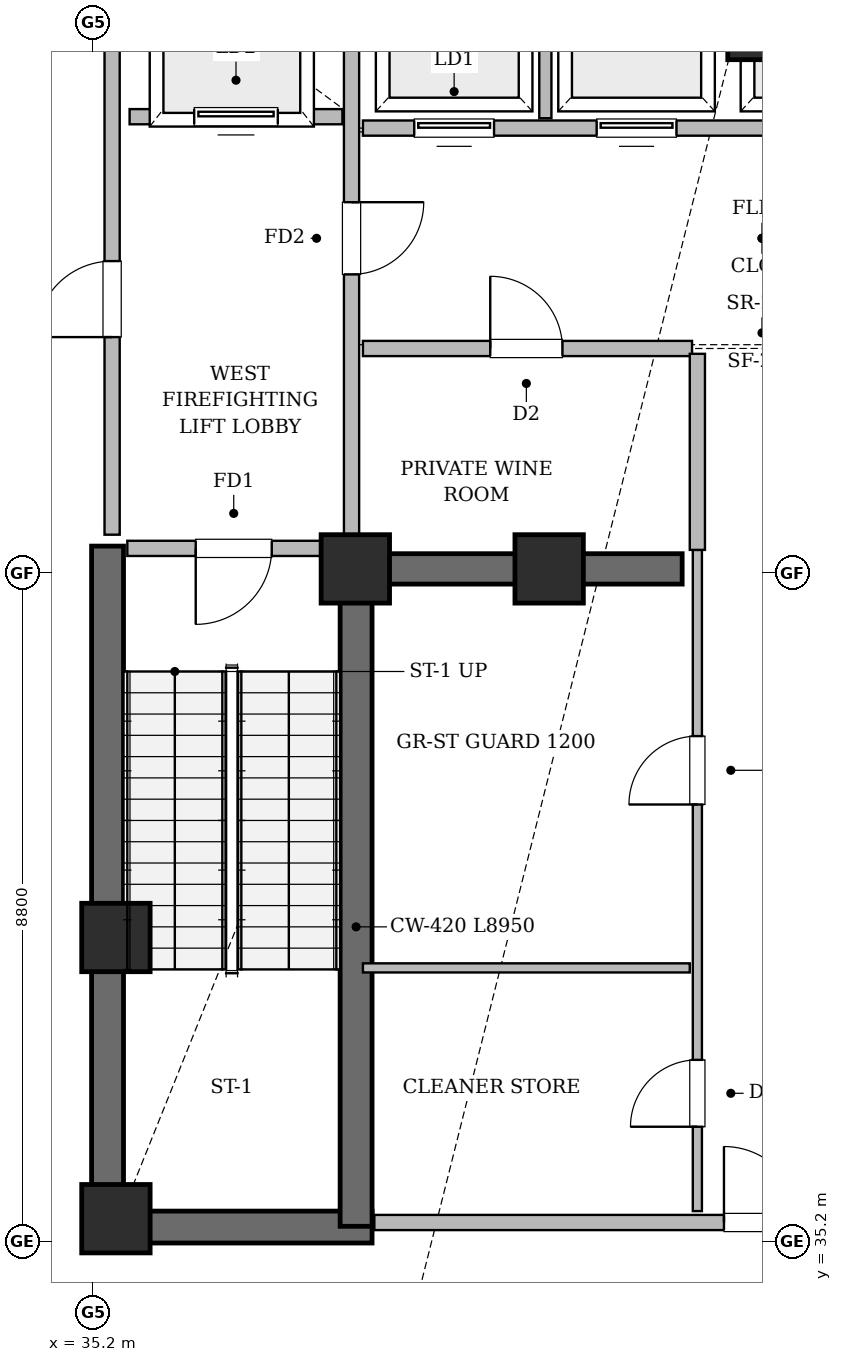
"""IFC4 building model, lengths in metres.
Left out: names, types, materials, properties, quantities, classifications, styles, units other than length and angle.
Written with IfcOpenShell. Run it as: python <this file> out.ifc"""

import sys

from ifc_helpers import new_model, si_unit, direction, frame, frame_2d, origin, origin_2d, place, context, subcontext, project, spatial, rectangle, extrude, element, fill, save


model = new_model("IFC4")
c1 = context("Model", 3, precision=1e-05, world=origin(), true_north=direction((0.0, 1.0)))
c2 = subcontext(c1, "Body", "Model", "MODEL_VIEW")
j1 = project(units=[si_unit("LENGTHUNIT", "METRE"), si_unit("PLANEANGLEUNIT", "RADIAN")], contexts=[c1])
p1 = place(None, origin())
s1 = spatial("IfcSite", under=j1, at=p1, CompositionType="ELEMENT")
p2 = place(p1, origin())
s2 = spatial("IfcBuilding", under=s1, at=p2, CompositionType="ELEMENT")
p3 = place(p2, frame((0.0, 0.0, 295.4)))
s3 = spatial("IfcBuildingStorey", under=s2, at=p3, CompositionType="ELEMENT", Elevation=295.4)
p4 = place(p3, frame((35.18, 35.39, 0.0), z_axis=(0.0, 0.0, 1.0), x_axis=(1.0, 0.0, 0.0)))
e1 = element("IfcWall", 1, at=p4, inside=s3, PredefinedType="SHEAR", context=c2, shape_type="SweptSolid", body=[
    extrude(rectangle(XDim=3.69, YDim=0.42, at=frame_2d((1.845, 0.0))), origin(), (0.0, 0.0, 1.0), 5.14),
])
p5 = place(p3, frame((35.39, 35.18, 0.0), z_axis=(0.0, 0.0, 1.0), x_axis=(0.0, 1.0, 0.0)))
e2 = element("IfcWall", 2, at=p5, inside=s3, PredefinedType="SHEAR", context=c2, shape_type="SweptSolid", body=[
    extrude(rectangle(XDim=9.17, YDim=0.42, at=frame_2d((4.585, 0.0))), origin(), (0.0, 0.0, 1.0), 5.14),
])
p6 = place(p3, frame((38.66, 35.4, 0.0), z_axis=(0.0, 0.0, 1.0), x_axis=(0.0, 1.0, 0.0)))
e3 = element("IfcWall", 3, at=p6, inside=s3, PredefinedType="SHEAR", context=c2, shape_type="SweptSolid", body=[
    extrude(rectangle(XDim=8.95, YDim=0.42, at=frame_2d((4.475, 0.0))), origin(), (0.0, 0.0, 1.0), 5.14),
])
p7 = place(p3, frame((44.0, 50.1, 0.0), z_axis=(0.0, 0.0, 1.0), x_axis=(0.0, 1.0, 0.0)))
e4 = element("IfcWall", 4, at=p7, inside=s3, PredefinedType="SHEAR", context=c2, shape_type="SweptSolid", body=[
    extrude(rectangle(XDim=2.1, YDim=0.4, at=frame_2d((1.05, 0.0))), origin(), (0.0, 0.0, 1.0), 5.14),
])
p8 = place(p3, frame((38.75, 44.05, 0.0), z_axis=(0.0, 0.0, 1.0), x_axis=(1.0, 0.0, 0.0)))
e5 = element("IfcWall", 5, at=p8, inside=s3, PredefinedType="SHEAR", context=c2, shape_type="SweptSolid", body=[
    extrude(rectangle(XDim=4.2, YDim=0.4, at=frame_2d((2.1, 0.0))), origin(), (0.0, 0.0, 1.0), 5.14),
])
for number, where, z_axis, x_axis in (
    (6, (35.5, 35.5, 0.0), (0.0, 0.0, 1.0), (1.0, 0.0, 0.0)),
    (7, (38.65, 44.05, 0.0), (0.0, 0.0, 1.0), (1.0, 0.0, 0.0)),
    (8, (44.0, 51.2, 0.0), (0.0, 0.0, 1.0), (1.0, 0.0, 0.0)),
    (9, (35.5, 39.2, 0.0), (0.0, 0.0, 1.0), (1.0, 0.0, 0.0)),
    (10, (41.2, 44.05, 0.0), (0.0, 0.0, 1.0), (1.0, 0.0, 0.0)),
):
    element("IfcColumn", number, at=place(p3, frame(where, z_axis=z_axis, x_axis=x_axis)), inside=s3, PredefinedType="COLUMN", context=c2, shape_type="SweptSolid", body=[
        extrude(rectangle(XDim=0.9, YDim=0.9, at=origin_2d()), origin(), (0.0, 0.0, 1.0), 5.4),
    ])
p9 = place(p3, frame((38.9, 35.45, 0.0), z_axis=(0.0, 0.0, 1.0), x_axis=(1.0, 0.0, 0.0)))
e11 = element("IfcWall", 11, at=p9, inside=s3, PredefinedType="SOLIDWALL", context=c2, shape_type="SweptSolid", body=[
    extrude(rectangle(XDim=10.2, YDim=0.2, at=frame_2d((5.1, 0.0))), origin(), (0.0, 0.0, 1.0), 5.14),
])
p10 = place(p9, frame((4.6, 0.0, 0.0)))
e12 = element("IfcOpeningElement", 12, at=p10, cuts=e11, PredefinedType="OPENING", context=c2, shape_type="SweptSolid", body=[
    extrude(rectangle(XDim=1.0, YDim=2.15, at=frame_2d((0.5, 1.075))), frame((0.0, 0.11, 0.0), z_axis=(0.0, -1.0, 0.0), x_axis=(1.0, 0.0, 0.0)), (0.0, 0.0, 1.0), 0.22),
])
p11 = place(p3, frame((43.15, 35.6, 0.0), z_axis=(0.0, 0.0, 1.0), x_axis=(0.0, 1.0, 0.0)))
e13 = element("IfcWall", 13, at=p11, inside=s3, PredefinedType="PARTITIONING", context=c2, shape_type="SweptSolid", body=[
    extrude(rectangle(XDim=8.7, YDim=0.12, at=frame_2d((4.35, 0.0))), origin(), (0.0, 0.0, 1.0), 5.14),
])
p12 = place(p11, frame((1.11, 0.0, 0.0)))
e14 = element("IfcOpeningElement", 14, at=p12, cuts=e13, PredefinedType="OPENING", context=c2, shape_type="SweptSolid", body=[
    extrude(rectangle(XDim=0.88, YDim=2.1, at=frame_2d((0.44, 1.05))), frame((0.0, 0.07, 0.0), z_axis=(0.0, -1.0, 0.0), x_axis=(1.0, 0.0, 0.0)), (0.0, 0.0, 1.0), 0.14),
])
p13 = place(p11, frame((5.35, 0.0, 0.0)))
e15 = element("IfcOpeningElement", 15, at=p13, cuts=e13, PredefinedType="OPENING", context=c2, shape_type="SweptSolid", body=[
    extrude(rectangle(XDim=0.9, YDim=2.1, at=frame_2d((0.45, 1.05))), frame((0.0, 0.07, 0.0), z_axis=(0.0, -1.0, 0.0), x_axis=(1.0, 0.0, 0.0)), (0.0, 0.0, 1.0), 0.14),
])
p14 = place(p3, frame((35.45, 44.5, 0.0), z_axis=(0.0, 0.0, 1.0), x_axis=(0.0, 1.0, 0.0)))
e16 = element("IfcWall", 16, at=p14, inside=s3, PredefinedType="SOLIDWALL", context=c2, shape_type="SweptSolid", body=[
    extrude(rectangle(XDim=7.92, YDim=0.2, at=frame_2d((3.96, 0.0))), origin(), (0.0, 0.0, 1.0), 5.14),
])
p15 = place(p14, frame((2.6, 0.0, 0.0)))
e17 = element("IfcOpeningElement", 17, at=p15, cuts=e16, PredefinedType="OPENING", context=c2, shape_type="SweptSolid", body=[
    extrude(rectangle(XDim=1.0, YDim=2.15, at=frame_2d((0.5, 1.075))), frame((0.0, 0.11, 0.0), z_axis=(0.0, -1.0, 0.0), x_axis=(1.0, 0.0, 0.0)), (0.0, 0.0, 1.0), 0.22),
])
p16 = place(p3, frame((38.6, 44.5, 0.0), z_axis=(0.0, 0.0, 1.0), x_axis=(0.0, 1.0, 0.0)))
e18 = element("IfcWall", 18, at=p16, inside=s3, PredefinedType="SOLIDWALL", context=c2, shape_type="SweptSolid", body=[
    extrude(rectangle(XDim=7.92, YDim=0.2, at=frame_2d((3.96, 0.0))), origin(), (0.0, 0.0, 1.0), 5.14),
])
p17 = place(p16, frame((3.425, 0.0, 0.0)))
e19 = element("IfcOpeningElement", 19, at=p17, cuts=e18, PredefinedType="OPENING", context=c2, shape_type="SweptSolid", body=[
    extrude(rectangle(XDim=0.95, YDim=2.15, at=frame_2d((0.475, 1.075))), frame((0.0, 0.11, 0.0), z_axis=(0.0, -1.0, 0.0), x_axis=(1.0, 0.0, 0.0)), (0.0, 0.0, 1.0), 0.22),
])
p18 = place(p3, frame((38.75, 49.85, 0.0), z_axis=(0.0, 0.0, 1.0), x_axis=(1.0, 0.0, 0.0)))
e20 = element("IfcWall", 20, at=p18, inside=s3, PredefinedType="SOLIDWALL", context=c2, shape_type="SweptSolid", body=[
    extrude(rectangle(XDim=5.5, YDim=0.2, at=frame_2d((2.75, 0.0))), origin(), (0.0, 0.0, 1.0), 5.14),
])
p19 = place(p18, frame((0.675, 0.0, 0.0)))
e21 = element("IfcOpeningElement", 21, at=p19, cuts=e20, PredefinedType="OPENING", context=c2, shape_type="SweptSolid", body=[
    extrude(rectangle(XDim=1.05, YDim=2.15, at=frame_2d((0.525, 1.075))), frame((0.0, 0.11, 0.0), z_axis=(0.0, -1.0, 0.0), x_axis=(1.0, 0.0, 0.0)), (0.0, 0.0, 1.0), 0.22),
])
p20 = place(p18, frame((3.075, 0.0, 0.0)))
e22 = element("IfcOpeningElement", 22, at=p20, cuts=e20, PredefinedType="OPENING", context=c2, shape_type="SweptSolid", body=[
    extrude(rectangle(XDim=1.05, YDim=2.15, at=frame_2d((0.525, 1.075))), frame((0.0, 0.11, 0.0), z_axis=(0.0, -1.0, 0.0), x_axis=(1.0, 0.0, 0.0)), (0.0, 0.0, 1.0), 0.22),
])
p21 = place(p3, frame((38.75, 46.95, 0.0), z_axis=(0.0, 0.0, 1.0), x_axis=(1.0, 0.0, 0.0)))
e23 = element("IfcWall", 23, at=p21, inside=s3, PredefinedType="SOLIDWALL", context=c2, shape_type="SweptSolid", body=[
    extrude(rectangle(XDim=4.33, YDim=0.2, at=frame_2d((2.165, 0.0))), origin(), (0.0, 0.0, 1.0), 5.14),
])
p22 = place(p21, frame((1.675, 0.0, 0.0)))
e24 = element("IfcOpeningElement", 24, at=p22, cuts=e23, PredefinedType="OPENING", context=c2, shape_type="SweptSolid", body=[
    extrude(rectangle(XDim=0.95, YDim=2.1, at=frame_2d((0.475, 1.05))), frame((0.0, 0.11, 0.0), z_axis=(0.0, -1.0, 0.0), x_axis=(1.0, 0.0, 0.0)), (0.0, 0.0, 1.0), 0.22),
])
p23 = place(p3, frame((35.65, 44.32, 0.0), z_axis=(0.0, 0.0, 1.0), x_axis=(1.0, 0.0, 0.0)))
e25 = element("IfcWall", 25, at=p23, inside=s3, PredefinedType="SOLIDWALL", context=c2, shape_type="SweptSolid", body=[
    extrude(rectangle(XDim=2.8, YDim=0.2, at=frame_2d((1.4, 0.0))), origin(), (0.0, 0.0, 1.0), 5.14),
])
p24 = place(p23, frame((0.9, 0.0, 0.0)))
e26 = element("IfcOpeningElement", 26, at=p24, cuts=e25, PredefinedType="OPENING", context=c2, shape_type="SweptSolid", body=[
    extrude(rectangle(XDim=1.0, YDim=2.15, at=frame_2d((0.5, 1.075))), frame((0.0, 0.11, 0.0), z_axis=(0.0, -1.0, 0.0), x_axis=(1.0, 0.0, 0.0)), (0.0, 0.0, 1.0), 0.22),
])
p25 = place(p3, frame((35.68, 50.0, 0.0), z_axis=(0.0, 0.0, 1.0), x_axis=(1.0, 0.0, 0.0)))
e27 = element("IfcWall", 27, at=p25, inside=s3, PredefinedType="SOLIDWALL", context=c2, shape_type="SweptSolid", body=[
    extrude(rectangle(XDim=2.8, YDim=0.2, at=frame_2d((1.4, 0.0))), origin(), (0.0, 0.0, 1.0), 5.14),
])
p26 = place(p25, frame((0.85, 0.0, 0.0)))
e28 = element("IfcOpeningElement", 28, at=p26, cuts=e27, PredefinedType="OPENING", context=c2, shape_type="SweptSolid", body=[
    extrude(rectangle(XDim=1.1, YDim=2.15, at=frame_2d((0.55, 1.075))), frame((0.0, 0.11, 0.0), z_axis=(0.0, -1.0, 0.0), x_axis=(1.0, 0.0, 0.0)), (0.0, 0.0, 1.0), 0.22),
])
p27 = place(p3, frame((38.75, 38.8, 0.0), z_axis=(0.0, 0.0, 1.0), x_axis=(1.0, 0.0, 0.0)))
e29 = element("IfcWall", 29, at=p27, inside=s3, PredefinedType="PARTITIONING", context=c2, shape_type="SweptSolid", body=[
    extrude(rectangle(XDim=4.3, YDim=0.12, at=frame_2d((2.15, 0.0))), origin(), (0.0, 0.0, 1.0), 5.14),
])
p28 = place(p3, frame((43.15, 44.3, 0.0), z_axis=(0.0, 0.0, 1.0), x_axis=(0.0, 1.0, 0.0)))
e30 = element("IfcWall", 30, at=p28, inside=s3, PredefinedType="SOLIDWALL", context=c2, shape_type="SweptSolid", body=[
    extrude(rectangle(XDim=2.58, YDim=0.2, at=frame_2d((1.29, 0.0))), origin(), (0.0, 0.0, 1.0), 5.14),
])
p29 = place(p3, frame((41.15, 49.98, 0.0), z_axis=(0.0, 0.0, 1.0), x_axis=(0.0, 1.0, 0.0)))
e31 = element("IfcWall", 31, at=p29, inside=s3, PredefinedType="SOLIDWALL", context=c2, shape_type="SweptSolid", body=[
    extrude(rectangle(XDim=2.37, YDim=0.16, at=frame_2d((1.185, 0.0))), origin(), (0.0, 0.0, 1.0), 5.14),
])
p30 = place(p24, frame((1.0, 0.0, 0.0), z_axis=(0.0, 0.0, 1.0), x_axis=(-1.0, 0.0, 0.0)))
e32 = element("IfcDoor", 32, at=p30, inside=s3, OperationType="SINGLE_SWING_LEFT", PredefinedType="DOOR", context=c2, shape_type="SweptSolid", body=[
    extrude(rectangle(XDim=1.0, YDim=2.15, at=frame_2d((0.5, 1.075))), frame((0.0, 0.025, 0.0), z_axis=(0.0, -1.0, 0.0), x_axis=(1.0, 0.0, 0.0)), (0.0, 0.0, 1.0), 0.05),
])
fill(e26, e32)
p31 = place(p15, origin())
e33 = element("IfcDoor", 33, at=p31, inside=s3, OperationType="SINGLE_SWING_LEFT", PredefinedType="DOOR", context=c2, shape_type="SweptSolid", body=[
    extrude(rectangle(XDim=1.0, YDim=2.15, at=frame_2d((0.5, 1.075))), frame((0.0, 0.025, 0.0), z_axis=(0.0, -1.0, 0.0), x_axis=(1.0, 0.0, 0.0)), (0.0, 0.0, 1.0), 0.05),
])
fill(e17, e33)
p32 = place(p17, frame((0.95, 0.0, 0.0), z_axis=(0.0, 0.0, 1.0), x_axis=(-1.0, 0.0, 0.0)))
e34 = element("IfcDoor", 34, at=p32, inside=s3, OperationType="SINGLE_SWING_RIGHT", PredefinedType="DOOR", context=c2, shape_type="SweptSolid", body=[
    extrude(rectangle(XDim=0.95, YDim=2.15, at=frame_2d((0.475, 1.075))), frame((0.0, 0.025, 0.0), z_axis=(0.0, -1.0, 0.0), x_axis=(1.0, 0.0, 0.0)), (0.0, 0.0, 1.0), 0.05),
])
fill(e19, e34)
p33 = place(p26, origin())
e35 = element("IfcDoor", 35, at=p33, inside=s3, OperationType="SLIDING_TO_LEFT", PredefinedType="DOOR", context=c2, shape_type="SweptSolid", body=[
    extrude(rectangle(XDim=1.1, YDim=2.15, at=frame_2d((0.55, 1.075))), frame((0.0, 0.025, 0.0), z_axis=(0.0, -1.0, 0.0), x_axis=(1.0, 0.0, 0.0)), (0.0, 0.0, 1.0), 0.05),
])
fill(e28, e35)
p34 = place(p10, origin())
e36 = element("IfcDoor", 36, at=p34, inside=s3, OperationType="SINGLE_SWING_LEFT", PredefinedType="DOOR", context=c2, shape_type="SweptSolid", body=[
    extrude(rectangle(XDim=1.0, YDim=2.15, at=frame_2d((0.5, 1.075))), frame((0.0, 0.025, 0.0), z_axis=(0.0, -1.0, 0.0), x_axis=(1.0, 0.0, 0.0)), (0.0, 0.0, 1.0), 0.05),
])
fill(e12, e36)
p35 = place(p19, origin())
e37 = element("IfcDoor", 37, at=p35, inside=s3, OperationType="SLIDING_TO_LEFT", PredefinedType="DOOR", context=c2, shape_type="SweptSolid", body=[
    extrude(rectangle(XDim=1.05, YDim=2.15, at=frame_2d((0.525, 1.075))), frame((0.0, 0.025, 0.0), z_axis=(0.0, -1.0, 0.0), x_axis=(1.0, 0.0, 0.0)), (0.0, 0.0, 1.0), 0.05),
])
fill(e21, e37)
p36 = place(p20, origin())
e38 = element("IfcDoor", 38, at=p36, inside=s3, OperationType="SLIDING_TO_LEFT", PredefinedType="DOOR", context=c2, shape_type="SweptSolid", body=[
    extrude(rectangle(XDim=1.05, YDim=2.15, at=frame_2d((0.525, 1.075))), frame((0.0, 0.025, 0.0), z_axis=(0.0, -1.0, 0.0), x_axis=(1.0, 0.0, 0.0)), (0.0, 0.0, 1.0), 0.05),
])
fill(e22, e38)
p37 = place(p22, origin())
e39 = element("IfcDoor", 39, at=p37, inside=s3, OperationType="SINGLE_SWING_LEFT", PredefinedType="DOOR", context=c2, shape_type="SweptSolid", body=[
    extrude(rectangle(XDim=0.95, YDim=2.1, at=frame_2d((0.475, 1.05))), frame((0.0, 0.025, 0.0), z_axis=(0.0, -1.0, 0.0), x_axis=(1.0, 0.0, 0.0)), (0.0, 0.0, 1.0), 0.05),
])
fill(e24, e39)
p38 = place(p12, origin())
e40 = element("IfcDoor", 40, at=p38, inside=s3, OperationType="SINGLE_SWING_LEFT", PredefinedType="DOOR", context=c2, shape_type="SweptSolid", body=[
    extrude(rectangle(XDim=0.88, YDim=2.1, at=frame_2d((0.44, 1.05))), frame((0.0, 0.025, 0.0), z_axis=(0.0, -1.0, 0.0), x_axis=(1.0, 0.0, 0.0)), (0.0, 0.0, 1.0), 0.05),
])
fill(e14, e40)
p39 = place(p13, origin())
e41 = element("IfcDoor", 41, at=p39, inside=s3, OperationType="SINGLE_SWING_LEFT", PredefinedType="DOOR", context=c2, shape_type="SweptSolid", body=[
    extrude(rectangle(XDim=0.9, YDim=2.1, at=frame_2d((0.45, 1.05))), frame((0.0, 0.025, 0.0), z_axis=(0.0, -1.0, 0.0), x_axis=(1.0, 0.0, 0.0)), (0.0, 0.0, 1.0), 0.05),
])
fill(e15, e41)
save(model, sys.argv[1])
